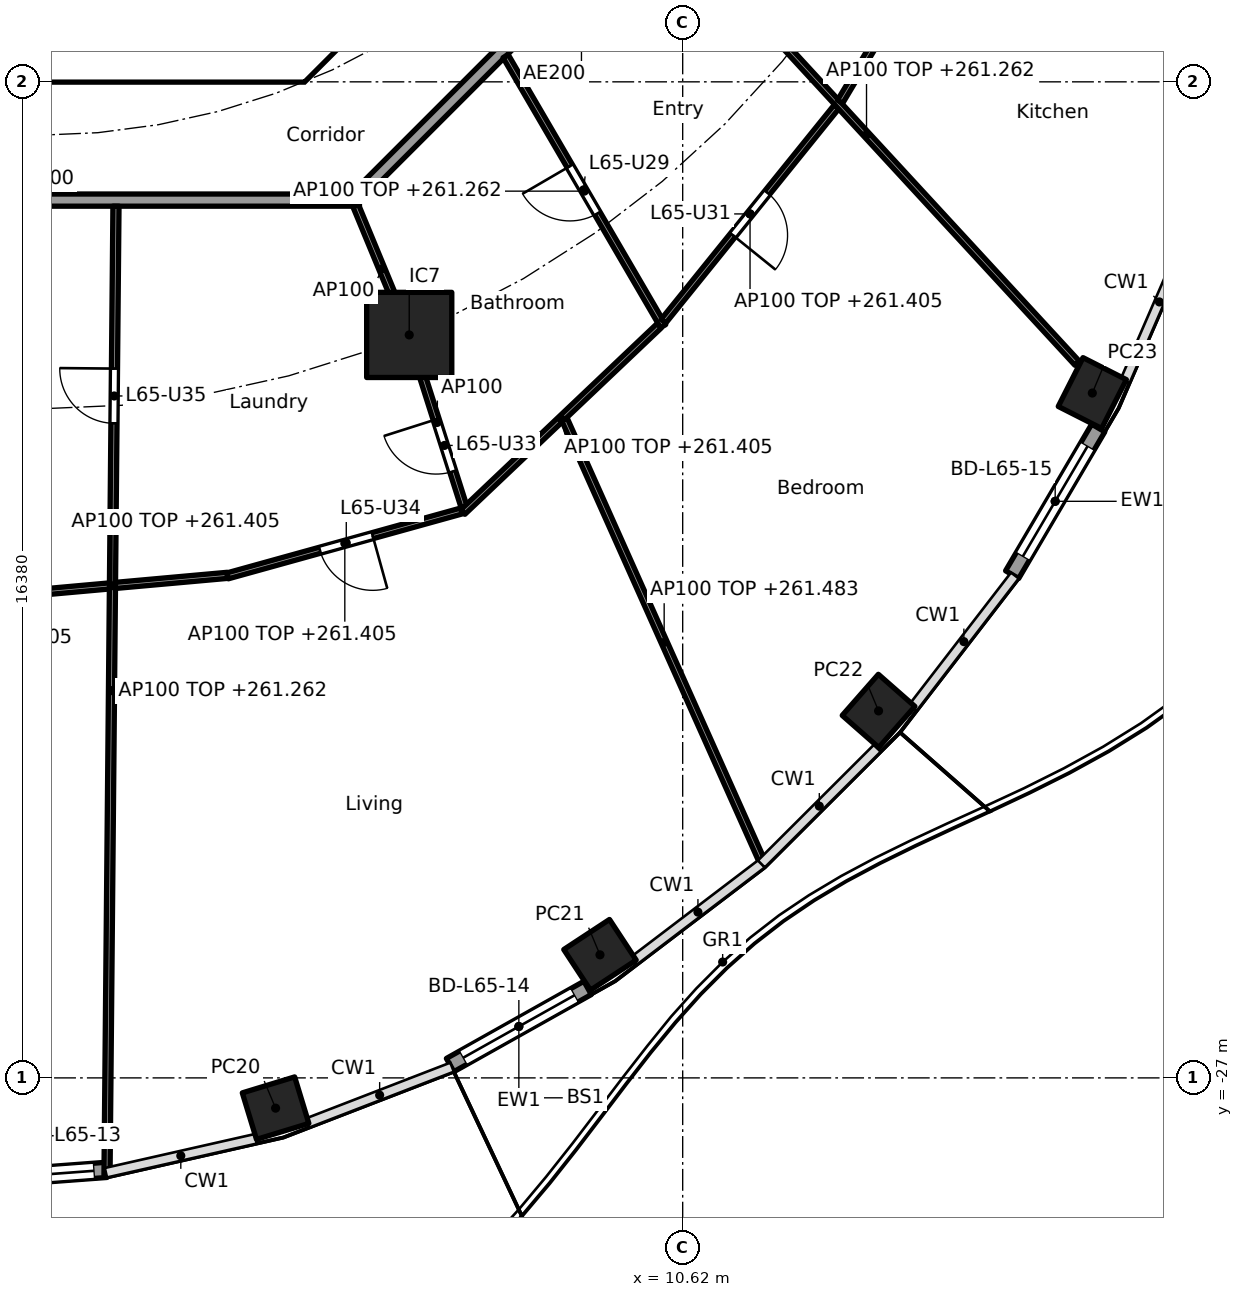
"""IFC4 building model, lengths in metres.
Left out: names, types, materials, properties, quantities, classifications, styles, units other than length and angle.
Written with IfcOpenShell. Run it as: python <this file> out.ifc"""

import sys

from ifc_helpers import new_model, si_unit, direction, frame, frame_2d, origin, origin_2d, place, context, subcontext, project, spatial, polyline, rectangle, hollow_rectangle, outline, extrude, element, fill, save


model = new_model("IFC4")
c1 = context("Model", 3, precision=1e-05, world=origin(), true_north=direction((0.0, 1.0)))
c2 = subcontext(c1, "Body", "Model", "MODEL_VIEW")
j1 = project(units=[si_unit("LENGTHUNIT", "METRE"), si_unit("PLANEANGLEUNIT", "RADIAN")], contexts=[c1])
p1 = place(None, origin())
s1 = spatial("IfcSite", under=j1, at=p1, CompositionType="ELEMENT")
p2 = place(p1, origin())
s2 = spatial("IfcBuilding", under=s1, at=p2, CompositionType="ELEMENT")
p3 = place(p2, frame((0.0, 0.0, 258.5)))
s3 = spatial("IfcBuildingStorey", under=s2, at=p3, CompositionType="ELEMENT", Elevation=258.5)
for number, where, z_axis, x_axis in (
    (1, (3.925, -27.498, -0.26), (0.0, 0.0, 1.0), (0.957, 0.292, 0.0)),
    (2, (9.26, -24.976, -0.26), (0.0, 0.0, 1.0), (0.836, 0.549, 0.0)),
    (3, (13.841, -20.965, -0.26), (0.0, 0.0, 1.0), (0.66, 0.751, 0.0)),
    (4, (17.356, -15.738, -0.26), (0.0, 0.0, 1.0), (0.452, 0.892, 0.0)),
):
    element("IfcColumn", number, at=place(p3, frame(where, z_axis=z_axis, x_axis=x_axis)), inside=s3, PredefinedType="COLUMN", context=c2, shape_type="SweptSolid", body=[
        extrude(hollow_rectangle(XDim=0.9, YDim=0.8, WallThickness=0.028, at=origin_2d()), origin(), (0.0, 0.0, 1.0), 3.96),
    ])
p4 = place(p3, frame((6.123, -14.782, 0.0), z_axis=(0.0, 0.0, 1.0), x_axis=(1.0, 0.0, 0.0)))
e5 = element("IfcColumn", 5, at=p4, inside=s3, PredefinedType="COLUMN", context=c2, shape_type="SweptSolid", body=[
    extrude(rectangle(XDim=1.4, YDim=1.4, at=origin_2d()), origin(), (0.0, 0.0, 1.0), 3.7),
])
p5 = place(p3, frame((1.143, -28.513, 0.0), z_axis=(0.0, 0.0, 1.0), x_axis=(-0.997236892469, -0.074287147606, 0.0)))
e6 = element("IfcWall", 6, at=p5, inside=s3, PredefinedType="SOLIDWALL", context=c2, shape_type="SweptSolid", body=[
    extrude(rectangle(XDim=2.511, YDim=0.25, at=frame_2d((1.255, 0.0))), origin(), (0.0, 0.0, 1.0), 3.44),
])
p6 = place(p5, frame((0.205, 0.0, 0.0)))
e7 = element("IfcOpeningElement", 7, at=p6, cuts=e6, PredefinedType="OPENING", context=c2, shape_type="SweptSolid", body=[
    extrude(rectangle(XDim=2.1, YDim=2.4, at=frame_2d((1.05, 1.2))), frame((0.0, 0.135, 0.0), z_axis=(0.0, -1.0, 0.0), x_axis=(1.0, 0.0, 0.0)), (0.0, 0.0, 1.0), 0.27),
])
p7 = place(p3, frame((9.056, -25.521, 0.0), z_axis=(0.0, 0.0, 1.0), x_axis=(-0.872093060299, -0.489340059855, 0.0)))
e8 = element("IfcWall", 8, at=p7, inside=s3, PredefinedType="SOLIDWALL", context=c2, shape_type="SweptSolid", body=[
    extrude(rectangle(XDim=2.593, YDim=0.25, at=frame_2d((1.296, 0.0))), origin(), (0.0, 0.0, 1.0), 3.44),
])
p8 = place(p7, frame((0.247, 0.0, 0.0)))
e9 = element("IfcOpeningElement", 9, at=p8, cuts=e8, PredefinedType="OPENING", context=c2, shape_type="SweptSolid", body=[
    extrude(rectangle(XDim=2.1, YDim=2.4, at=frame_2d((1.05, 1.2))), frame((0.0, 0.135, 0.0), z_axis=(0.0, -1.0, 0.0), x_axis=(1.0, 0.0, 0.0)), (0.0, 0.0, 1.0), 0.27),
])
p9 = place(p3, frame((17.454, -16.312, 0.0), z_axis=(0.0, 0.0, 1.0), x_axis=(-0.506371364425, -0.862315511452, 0.0)))
e10 = element("IfcWall", 10, at=p9, inside=s3, PredefinedType="SOLIDWALL", context=c2, shape_type="SweptSolid", body=[
    extrude(rectangle(XDim=2.796, YDim=0.25, at=frame_2d((1.398, 0.0))), origin(), (0.0, 0.0, 1.0), 3.44),
])
p10 = place(p9, frame((0.348, 0.0, 0.0)))
e11 = element("IfcOpeningElement", 11, at=p10, cuts=e10, PredefinedType="OPENING", context=c2, shape_type="SweptSolid", body=[
    extrude(rectangle(XDim=2.1, YDim=2.4, at=frame_2d((1.05, 1.2))), frame((0.0, 0.135, 0.0), z_axis=(0.0, -1.0, 0.0), x_axis=(1.0, 0.0, 0.0)), (0.0, 0.0, 1.0), 0.27),
])
p11 = place(p3, frame((4.613, -9.988, 0.0), z_axis=(0.0, 0.0, 1.0), x_axis=(0.707106781187, 0.707106781187, 0.0)))
e12 = element("IfcWall", 12, at=p11, inside=s3, PredefinedType="SHEAR", context=c2, shape_type="SweptSolid", body=[
    extrude(rectangle(XDim=7.602, YDim=0.6, at=frame_2d((3.801, 0.0))), origin(), (0.0, 0.0, 1.0), 3.44),
])
p12 = place(p11, frame((3.201, 0.0, 0.0)))
e13 = element("IfcOpeningElement", 13, at=p12, cuts=e12, PredefinedType="OPENING", context=c2, shape_type="SweptSolid", body=[
    extrude(rectangle(XDim=1.2, YDim=2.1, at=frame_2d((0.6, 1.05))), frame((0.0, 0.31, 0.0), z_axis=(0.0, -1.0, 0.0), x_axis=(1.0, 0.0, 0.0)), (0.0, 0.0, 1.0), 0.62),
])
p13 = place(p3, origin())
e14 = element("IfcWall", 14, at=p13, inside=s3, PredefinedType="SHEAR", context=c2, shape_type="SweptSolid", body=[
    extrude(outline(polyline([(-4.152, -10.025), (4.152, -10.025), (4.401, -9.776), (4.825, -10.2), (4.401, -10.625), (-4.401, -10.625), (-4.825, -10.2), (-4.401, -9.776), (-4.152, -10.025)])), origin(), (0.0, 0.0, 1.0), 3.44),
])
p14 = place(p3, frame((-5.104, -12.565, 0.0), z_axis=(0.0, 0.0, 1.0), x_axis=(1.0, 0.0, 0.0)))
e15 = element("IfcWall", 15, at=p14, inside=s3, PredefinedType="PARTITIONING", context=c2, shape_type="SweptSolid", body=[
    extrude(rectangle(XDim=10.409, YDim=0.2, at=frame_2d((5.205, 0.0))), origin(), (0.0, 0.0, 1.0), 3.44),
])
p15 = place(p3, frame((5.275, -12.494, 0.0), z_axis=(0.0, 0.0, 1.0), x_axis=(0.707106781187, 0.707106781187, 0.0)))
e16 = element("IfcWall", 16, at=p15, inside=s3, PredefinedType="PARTITIONING", context=c2, shape_type="SweptSolid", body=[
    extrude(rectangle(XDim=10.409, YDim=0.2, at=frame_2d((5.205, 0.0))), origin(), (0.0, 0.0, 1.0), 3.44),
])
p16 = place(p15, frame((4.604, 0.0, 0.0)))
e17 = element("IfcOpeningElement", 17, at=p16, cuts=e16, PredefinedType="OPENING", context=c2, shape_type="SweptSolid", body=[
    extrude(rectangle(XDim=1.0, YDim=2.1, at=frame_2d((0.5, 1.05))), frame((0.0, 0.11, 0.0), z_axis=(0.0, -1.0, 0.0), x_axis=(1.0, 0.0, 0.0)), (0.0, 0.0, 1.0), 0.22),
])
p17 = place(p3, frame((-0.67, -19.077, 0.0), z_axis=(0.0, 0.0, 1.0), x_axis=(0.995986472869, 0.089503887414, 0.0)))
e18 = element("IfcWall", 18, at=p17, inside=s3, PredefinedType="PARTITIONING", context=c2, shape_type="SweptSolid", body=[
    extrude(rectangle(XDim=3.819, YDim=0.1, at=frame_2d((1.909, 0.0))), origin(), (0.0, 0.0, 1.0), 2.905),
])
p18 = place(p3, frame((1.3, -12.665, 0.0), z_axis=(0.0, 0.0, 1.0), x_axis=(-0.009254890166, -0.999957172587, 0.0)))
e19 = element("IfcWall", 19, at=p18, inside=s3, PredefinedType="PARTITIONING", context=c2, shape_type="SweptSolid", body=[
    extrude(rectangle(XDim=15.933, YDim=0.1, at=frame_2d((7.967, 0.0))), origin(), (0.0, 0.0, 1.0), 2.762),
])
p19 = place(p18, frame((2.671, 0.0, 0.0)))
e20 = element("IfcOpeningElement", 20, at=p19, cuts=e19, PredefinedType="OPENING", context=c2, shape_type="SweptSolid", body=[
    extrude(rectangle(XDim=0.9, YDim=2.1, at=frame_2d((0.45, 1.05))), frame((0.0, 0.06, 0.0), z_axis=(0.0, -1.0, 0.0), x_axis=(1.0, 0.0, 0.0)), (0.0, 0.0, 1.0), 0.12),
])
p20 = place(p3, frame((3.135, -18.744, 0.0), z_axis=(0.0, 0.0, 1.0), x_axis=(0.963606111552, 0.267326133738, 0.0)))
e21 = element("IfcWall", 21, at=p20, inside=s3, PredefinedType="PARTITIONING", context=c2, shape_type="SweptSolid", body=[
    extrude(rectangle(XDim=4.003, YDim=0.1, at=frame_2d((2.001, 0.0))), origin(), (0.0, 0.0, 1.0), 2.905),
])
p21 = place(p20, frame((1.576, 0.0, 0.0)))
e22 = element("IfcOpeningElement", 22, at=p21, cuts=e21, PredefinedType="OPENING", context=c2, shape_type="SweptSolid", body=[
    extrude(rectangle(XDim=0.9, YDim=2.1, at=frame_2d((0.45, 1.05))), frame((0.0, 0.06, 0.0), z_axis=(0.0, -1.0, 0.0), x_axis=(1.0, 0.0, 0.0)), (0.0, 0.0, 1.0), 0.12),
])
p22 = place(p3, frame((5.243, -12.657, 0.0), z_axis=(0.0, 0.0, 1.0), x_axis=(0.382719158442, -0.923864733477, 0.0)))
e23 = element("IfcWall", 23, at=p22, inside=s3, PredefinedType="PARTITIONING", context=c2, shape_type="SweptSolid", body=[
    extrude(rectangle(XDim=2.25, YDim=0.1, at=frame_2d((1.125, 0.0))), origin(), (0.0, 0.0, 1.0), 3.44),
])
p23 = place(p3, frame((6.138, -14.83, 0.0), z_axis=(0.0, 0.0, 1.0), x_axis=(0.303665801704, -0.952778610631, 0.0)))
e24 = element("IfcWall", 24, at=p23, inside=s3, PredefinedType="PARTITIONING", context=c2, shape_type="SweptSolid", body=[
    extrude(rectangle(XDim=2.922, YDim=0.1, at=frame_2d((1.461, 0.0))), origin(), (0.0, 0.0, 1.0), 3.44),
])
p24 = place(p23, frame((1.407, 0.0, 0.0)))
e25 = element("IfcOpeningElement", 25, at=p24, cuts=e24, PredefinedType="OPENING", context=c2, shape_type="SweptSolid", body=[
    extrude(rectangle(XDim=0.9, YDim=2.1, at=frame_2d((0.45, 1.05))), frame((0.0, 0.06, 0.0), z_axis=(0.0, -1.0, 0.0), x_axis=(1.0, 0.0, 0.0)), (0.0, 0.0, 1.0), 0.12),
])
p25 = place(p3, frame((7.004, -17.695, 0.0), z_axis=(0.0, 0.0, 1.0), x_axis=(0.725438442765, 0.68828705186, 0.0)))
e26 = element("IfcWall", 26, at=p25, inside=s3, PredefinedType="PARTITIONING", context=c2, shape_type="SweptSolid", body=[
    extrude(rectangle(XDim=4.456, YDim=0.1, at=frame_2d((2.228, 0.0))), origin(), (0.0, 0.0, 1.0), 2.905),
])
p26 = place(p3, frame((8.677, -16.173, 0.0), z_axis=(0.0, 0.0, 1.0), x_axis=(0.408174671437, -0.912903849043, 0.0)))
e27 = element("IfcWall", 27, at=p26, inside=s3, PredefinedType="PARTITIONING", context=c2, shape_type="SweptSolid", body=[
    extrude(rectangle(XDim=8.028, YDim=0.1, at=frame_2d((4.014, 0.0))), origin(), (0.0, 0.0, 1.0), 2.983),
])
p27 = place(p3, frame((7.708, -10.198, 0.0), z_axis=(0.0, 0.0, 1.0), x_axis=(0.503838537732, -0.863797851292, 0.0)))
e28 = element("IfcWall", 28, at=p27, inside=s3, PredefinedType="PARTITIONING", context=c2, shape_type="SweptSolid", body=[
    extrude(rectangle(XDim=5.14, YDim=0.1, at=frame_2d((2.57, 0.0))), origin(), (0.0, 0.0, 1.0), 2.762),
])
p28 = place(p27, frame((2.095, 0.0, 0.0)))
e29 = element("IfcOpeningElement", 29, at=p28, cuts=e28, PredefinedType="OPENING", context=c2, shape_type="SweptSolid", body=[
    extrude(rectangle(XDim=0.9, YDim=2.1, at=frame_2d((0.45, 1.05))), frame((0.0, 0.06, 0.0), z_axis=(0.0, -1.0, 0.0), x_axis=(1.0, 0.0, 0.0)), (0.0, 0.0, 1.0), 0.12),
])
p29 = place(p3, frame((10.304, -14.555, 0.0), z_axis=(0.0, 0.0, 1.0), x_axis=(0.628170338674, 0.778075848237, 0.0)))
e30 = element("IfcWall", 30, at=p29, inside=s3, PredefinedType="PARTITIONING", context=c2, shape_type="SweptSolid", body=[
    extrude(rectangle(XDim=4.532, YDim=0.1, at=frame_2d((2.266, 0.0))), origin(), (0.0, 0.0, 1.0), 2.905),
])
p30 = place(p29, frame((1.816, 0.0, 0.0)))
e31 = element("IfcOpeningElement", 31, at=p30, cuts=e30, PredefinedType="OPENING", context=c2, shape_type="SweptSolid", body=[
    extrude(rectangle(XDim=0.9, YDim=2.1, at=frame_2d((0.45, 1.05))), frame((0.0, 0.06, 0.0), z_axis=(0.0, -1.0, 0.0), x_axis=(1.0, 0.0, 0.0)), (0.0, 0.0, 1.0), 0.12),
])
p31 = place(p3, frame((10.179, -7.731, 0.0), z_axis=(0.0, 0.0, 1.0), x_axis=(0.67775318564, -0.73528947997, 0.0)))
e32 = element("IfcWall", 32, at=p31, inside=s3, PredefinedType="PARTITIONING", context=c2, shape_type="SweptSolid", body=[
    extrude(rectangle(XDim=10.222, YDim=0.1, at=frame_2d((5.111, 0.0))), origin(), (0.0, 0.0, 1.0), 2.762),
])
p32 = place(p31, frame((1.766, 0.0, 0.0)))
e33 = element("IfcOpeningElement", 33, at=p32, cuts=e32, PredefinedType="OPENING", context=c2, shape_type="SweptSolid", body=[
    extrude(rectangle(XDim=0.9, YDim=2.1, at=frame_2d((0.45, 1.05))), frame((0.0, 0.06, 0.0), z_axis=(0.0, -1.0, 0.0), x_axis=(1.0, 0.0, 0.0)), (0.0, 0.0, 1.0), 0.12),
])
p33 = place(p3, frame((13.208, -10.947, 0.0), z_axis=(0.0, 0.0, 1.0), x_axis=(0.512726452516, 0.858552028063, 0.0)))
e34 = element("IfcWall", 34, at=p33, inside=s3, PredefinedType="PARTITIONING", context=c2, shape_type="SweptSolid", body=[
    extrude(rectangle(XDim=4.772, YDim=0.1, at=frame_2d((2.386, 0.0))), origin(), (0.0, 0.0, 1.0), 2.905),
])
p34 = place(p33, frame((1.936, 0.0, 0.0)))
e35 = element("IfcOpeningElement", 35, at=p34, cuts=e34, PredefinedType="OPENING", context=c2, shape_type="SweptSolid", body=[
    extrude(rectangle(XDim=0.9, YDim=2.1, at=frame_2d((0.45, 1.05))), frame((0.0, 0.06, 0.0), z_axis=(0.0, -1.0, 0.0), x_axis=(1.0, 0.0, 0.0)), (0.0, 0.0, 1.0), 0.12),
])
p35 = place(p6, origin())
e36 = element("IfcDoor", 36, at=p35, inside=s3, OperationType="SLIDING_TO_LEFT", PredefinedType="DOOR", context=c2, shape_type="SweptSolid", body=[
    extrude(rectangle(XDim=2.1, YDim=2.4, at=frame_2d((1.05, 1.2))), frame((0.0, 0.025, 0.0), z_axis=(0.0, -1.0, 0.0), x_axis=(1.0, 0.0, 0.0)), (0.0, 0.0, 1.0), 0.05),
])
fill(e7, e36)
p36 = place(p8, origin())
e37 = element("IfcDoor", 37, at=p36, inside=s3, OperationType="SLIDING_TO_LEFT", PredefinedType="DOOR", context=c2, shape_type="SweptSolid", body=[
    extrude(rectangle(XDim=2.1, YDim=2.4, at=frame_2d((1.05, 1.2))), frame((0.0, 0.025, 0.0), z_axis=(0.0, -1.0, 0.0), x_axis=(1.0, 0.0, 0.0)), (0.0, 0.0, 1.0), 0.05),
])
fill(e9, e37)
p37 = place(p10, origin())
e38 = element("IfcDoor", 38, at=p37, inside=s3, OperationType="SLIDING_TO_LEFT", PredefinedType="DOOR", context=c2, shape_type="SweptSolid", body=[
    extrude(rectangle(XDim=2.1, YDim=2.4, at=frame_2d((1.05, 1.2))), frame((0.0, 0.025, 0.0), z_axis=(0.0, -1.0, 0.0), x_axis=(1.0, 0.0, 0.0)), (0.0, 0.0, 1.0), 0.05),
])
fill(e11, e38)
p38 = place(p28, frame((0.9, 0.0, 0.0), x_axis=(-1.0, 0.0, 0.0)))
e39 = element("IfcDoor", 39, at=p38, inside=s3, OperationType="SINGLE_SWING_RIGHT", PredefinedType="DOOR", context=c2, shape_type="SweptSolid", body=[
    extrude(rectangle(XDim=0.9, YDim=2.1, at=frame_2d((0.45, 1.05))), frame((0.0, 0.025, 0.0), z_axis=(0.0, -1.0, 0.0), x_axis=(1.0, 0.0, 0.0)), (0.0, 0.0, 1.0), 0.05),
])
fill(e29, e39)
p39 = place(p30, frame((0.9, 0.0, 0.0), x_axis=(-1.0, 0.0, 0.0)))
e40 = element("IfcDoor", 40, at=p39, inside=s3, OperationType="SINGLE_SWING_RIGHT", PredefinedType="DOOR", context=c2, shape_type="SweptSolid", body=[
    extrude(rectangle(XDim=0.9, YDim=2.1, at=frame_2d((0.45, 1.05))), frame((0.0, 0.025, 0.0), z_axis=(0.0, -1.0, 0.0), x_axis=(1.0, 0.0, 0.0)), (0.0, 0.0, 1.0), 0.05),
])
fill(e31, e40)
p40 = place(p24, frame((0.9, 0.0, 0.0), x_axis=(-1.0, 0.0, 0.0)))
e41 = element("IfcDoor", 41, at=p40, inside=s3, OperationType="SINGLE_SWING_RIGHT", PredefinedType="DOOR", context=c2, shape_type="SweptSolid", body=[
    extrude(rectangle(XDim=0.9, YDim=2.1, at=frame_2d((0.45, 1.05))), frame((0.0, 0.025, 0.0), z_axis=(0.0, -1.0, 0.0), x_axis=(1.0, 0.0, 0.0)), (0.0, 0.0, 1.0), 0.05),
])
fill(e25, e41)
p41 = place(p21, frame((0.9, 0.0, 0.0), x_axis=(-1.0, 0.0, 0.0)))
e42 = element("IfcDoor", 42, at=p41, inside=s3, OperationType="SINGLE_SWING_LEFT", PredefinedType="DOOR", context=c2, shape_type="SweptSolid", body=[
    extrude(rectangle(XDim=0.9, YDim=2.1, at=frame_2d((0.45, 1.05))), frame((0.0, 0.025, 0.0), z_axis=(0.0, -1.0, 0.0), x_axis=(1.0, 0.0, 0.0)), (0.0, 0.0, 1.0), 0.05),
])
fill(e22, e42)
p42 = place(p19, frame((0.9, 0.0, 0.0), x_axis=(-1.0, 0.0, 0.0)))
e43 = element("IfcDoor", 43, at=p42, inside=s3, OperationType="SINGLE_SWING_RIGHT", PredefinedType="DOOR", context=c2, shape_type="SweptSolid", body=[
    extrude(rectangle(XDim=0.9, YDim=2.1, at=frame_2d((0.45, 1.05))), frame((0.0, 0.025, 0.0), z_axis=(0.0, -1.0, 0.0), x_axis=(1.0, 0.0, 0.0)), (0.0, 0.0, 1.0), 0.05),
])
fill(e20, e43)
save(model, sys.argv[1])
